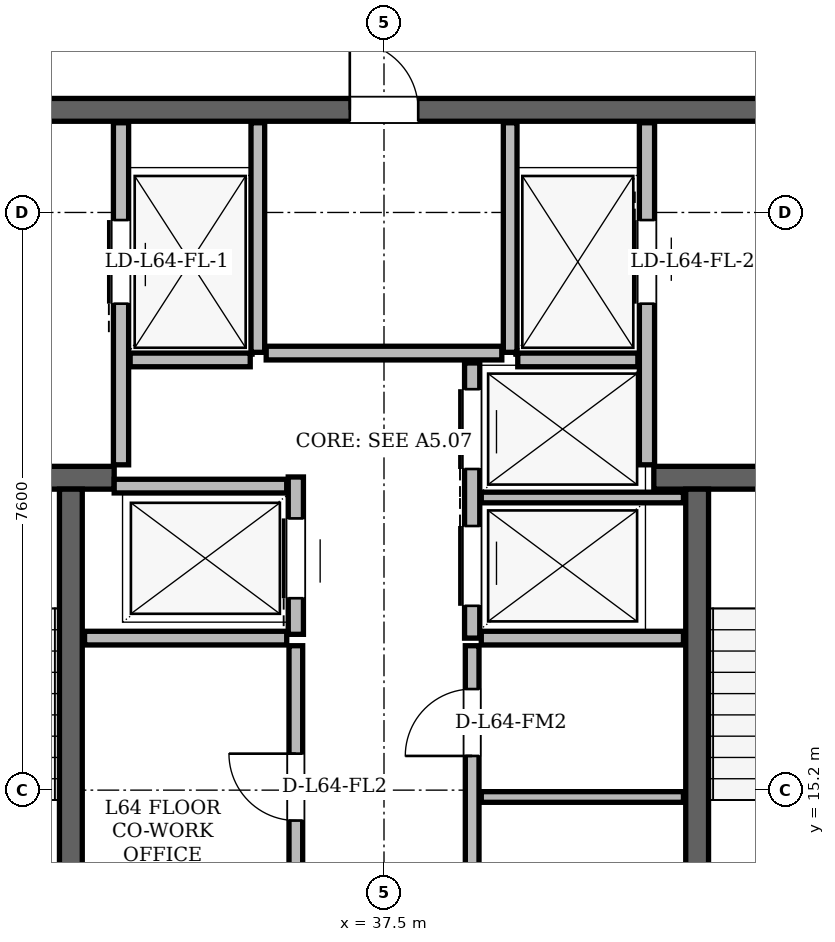
"""IFC4 building model, lengths in metres.
Left out: names, types, materials, properties, quantities, classifications, styles, units other than length and angle.
Written with IfcOpenShell. Run it as: python <this file> out.ifc"""

import sys

from ifc_helpers import new_model, si_unit, direction, frame, frame_2d, origin, place, context, subcontext, project, spatial, rectangle, extrude, element, fill, save


model = new_model("IFC4")
c1 = context("Model", 3, precision=1e-05, world=origin(), true_north=direction((0.0, 1.0)))
c2 = subcontext(c1, "Body", "Model", "MODEL_VIEW")
j1 = project(units=[si_unit("LENGTHUNIT", "METRE"), si_unit("PLANEANGLEUNIT", "RADIAN")], contexts=[c1])
p1 = place(None, origin())
s1 = spatial("IfcSite", under=j1, at=p1, CompositionType="ELEMENT")
p2 = place(p1, origin())
s2 = spatial("IfcBuilding", under=s1, at=p2, CompositionType="ELEMENT")
p3 = place(p2, frame((0.0, 0.0, 241.5)))
s3 = spatial("IfcBuildingStorey", under=s2, at=p3, CompositionType="ELEMENT", Elevation=241.5)
p4 = place(p3, frame((29.65, 24.15, 0.0), z_axis=(0.0, 0.0, 1.0), x_axis=(1.0, 0.0, 0.0)))
e1 = element("IfcWall", 1, at=p4, inside=s3, PredefinedType="SHEAR", context=c2, shape_type="SweptSolid", body=[
    extrude(rectangle(XDim=15.7, YDim=0.3, at=frame_2d((7.85, 0.0))), origin(), (0.0, 0.0, 1.0), 3.34),
])
p5 = place(p4, frame((1.7, 0.0, 0.0)))
e2 = element("IfcOpeningElement", 2, at=p5, cuts=e1, PredefinedType="OPENING", context=c2, shape_type="SweptSolid", body=[
    extrude(rectangle(XDim=1.2, YDim=2.2, at=frame_2d((0.6, 1.1))), frame((0.0, 0.15, 0.0), z_axis=(0.0, -1.0, 0.0), x_axis=(1.0, 0.0, 0.0)), (0.0, 0.0, 1.0), 0.3),
])
p6 = place(p4, frame((12.8, 0.0, 0.0)))
e3 = element("IfcOpeningElement", 3, at=p6, cuts=e1, PredefinedType="OPENING", context=c2, shape_type="SweptSolid", body=[
    extrude(rectangle(XDim=1.2, YDim=2.2, at=frame_2d((0.6, 1.1))), frame((0.0, 0.15, 0.0), z_axis=(0.0, -1.0, 0.0), x_axis=(1.0, 0.0, 0.0)), (0.0, 0.0, 1.0), 0.3),
])
p7 = place(p4, frame((7.4, 0.0, 0.0)))
e4 = element("IfcOpeningElement", 4, at=p7, cuts=e1, PredefinedType="OPENING", context=c2, shape_type="SweptSolid", body=[
    extrude(rectangle(XDim=0.9, YDim=2.05, at=frame_2d((0.45, 1.025))), frame((0.0, 0.15, 0.0), z_axis=(0.0, -1.0, 0.0), x_axis=(1.0, 0.0, 0.0)), (0.0, 0.0, 1.0), 0.3),
])
p8 = place(p3, frame((29.94, 19.31, 0.0), z_axis=(0.0, 0.0, 1.0), x_axis=(1.0, 0.0, 0.0)))
e5 = element("IfcWall", 5, at=p8, inside=s3, PredefinedType="SHEAR", context=c2, shape_type="SweptSolid", body=[
    extrude(rectangle(XDim=4.01, YDim=0.3, at=frame_2d((2.005, 0.0))), origin(), (0.0, 0.0, 1.0), 3.34),
])
p9 = place(p8, frame((1.01, 0.0, 0.0)))
e6 = element("IfcOpeningElement", 6, at=p9, cuts=e5, PredefinedType="OPENING", context=c2, shape_type="SweptSolid", body=[
    extrude(rectangle(XDim=1.4, YDim=2.2, at=frame_2d((0.7, 1.1))), frame((0.0, 0.15, 0.0), z_axis=(0.0, -1.0, 0.0), x_axis=(1.0, 0.0, 0.0)), (0.0, 0.0, 1.0), 0.3),
])
p10 = place(p3, frame((41.05, 19.31, 0.0), z_axis=(0.0, 0.0, 1.0), x_axis=(1.0, 0.0, 0.0)))
e7 = element("IfcWall", 7, at=p10, inside=s3, PredefinedType="SHEAR", context=c2, shape_type="SweptSolid", body=[
    extrude(rectangle(XDim=4.01, YDim=0.3, at=frame_2d((2.005, 0.0))), origin(), (0.0, 0.0, 1.0), 3.34),
])
p11 = place(p10, frame((1.6, 0.0, 0.0)))
e8 = element("IfcOpeningElement", 8, at=p11, cuts=e7, PredefinedType="OPENING", context=c2, shape_type="SweptSolid", body=[
    extrude(rectangle(XDim=1.4, YDim=2.2, at=frame_2d((0.7, 1.1))), frame((0.0, 0.15, 0.0), z_axis=(0.0, -1.0, 0.0), x_axis=(1.0, 0.0, 0.0)), (0.0, 0.0, 1.0), 0.3),
])
for number, where, z_axis, x_axis in (
    (9, (33.38, 11.54, 0.0), (0.0, 0.0, 1.0), (0.0, 1.0, 0.0)),
    (10, (41.62, 11.54, 0.0), (0.0, 0.0, 1.0), (0.0, 1.0, 0.0)),
):
    element("IfcWall", number, at=place(p3, frame(where, z_axis=z_axis, x_axis=x_axis)), inside=s3, PredefinedType="SHEAR", context=c2, shape_type="SweptSolid", body=[
        extrude(rectangle(XDim=7.62, YDim=0.3, at=frame_2d((3.81, 0.0))), origin(), (0.0, 0.0, 1.0), 3.34),
    ])
p12 = place(p3, frame((58.857, 11.097, 0.0), z_axis=(0.0, 0.0, 1.0), x_axis=(-0.499999075663, 0.86602593745, 0.0)))
e11 = element("IfcWall", 11, at=p12, inside=s3, PredefinedType="SOLIDWALL", context=c2, shape_type="SweptSolid", body=[
    extrude(rectangle(XDim=36.951, YDim=0.29, at=frame_2d((18.476, 0.0))), origin(), (0.0, 0.0, 1.0), 2.637),
])
p13 = place(p12, frame((7.615, 0.0, 0.0)))
e12 = element("IfcOpeningElement", 12, at=p13, cuts=e11, PredefinedType="OPENING", context=c2, shape_type="SweptSolid", body=[
    extrude(rectangle(XDim=1.5, YDim=2.2, at=frame_2d((0.75, 1.1))), frame((0.0, 0.145, 0.0), z_axis=(0.0, -1.0, 0.0), x_axis=(1.0, 0.0, 0.0)), (0.0, 0.0, 1.0), 0.29),
])
p14 = place(p12, frame((28.662, 0.0, 0.0)))
e13 = element("IfcOpeningElement", 13, at=p14, cuts=e11, PredefinedType="OPENING", context=c2, shape_type="SweptSolid", body=[
    extrude(rectangle(XDim=1.5, YDim=2.2, at=frame_2d((0.75, 1.1))), frame((0.0, 0.145, 0.0), z_axis=(0.0, -1.0, 0.0), x_axis=(1.0, 0.0, 0.0)), (0.0, 0.0, 1.0), 0.29),
])
p15 = place(p12, frame((3.768, 0.0, 0.85)))
e14 = element("IfcOpeningElement", 14, at=p15, cuts=e11, PredefinedType="OPENING", context=c2, shape_type="SweptSolid", body=[
    extrude(rectangle(XDim=1.2, YDim=1.48, at=frame_2d((0.6, 0.74))), frame((0.0, 0.145, 0.0), z_axis=(0.0, -1.0, 0.0), x_axis=(1.0, 0.0, 0.0)), (0.0, 0.0, 1.0), 0.29),
])
p16 = place(p12, frame((1.122, 0.0, 0.85)))
e15 = element("IfcOpeningElement", 15, at=p16, cuts=e11, PredefinedType="OPENING", context=c2, shape_type="SweptSolid", body=[
    extrude(rectangle(XDim=1.6, YDim=1.677, at=frame_2d((0.8, 0.838))), frame((0.0, 0.145, 0.0), z_axis=(0.0, -1.0, 0.0), x_axis=(1.0, 0.0, 0.0)), (0.0, 0.0, 1.0), 0.29),
])
p17 = place(p12, frame((34.681, 0.0, 0.85)))
e16 = element("IfcOpeningElement", 16, at=p17, cuts=e11, PredefinedType="OPENING", context=c2, shape_type="SweptSolid", body=[
    extrude(rectangle(XDim=1.2, YDim=1.48, at=frame_2d((0.6, 0.74))), frame((0.0, 0.145, 0.0), z_axis=(0.0, -1.0, 0.0), x_axis=(1.0, 0.0, 0.0)), (0.0, 0.0, 1.0), 0.29),
])
p18 = place(p12, frame((16.81, 0.0, 0.85)))
e17 = element("IfcOpeningElement", 17, at=p18, cuts=e11, PredefinedType="OPENING", context=c2, shape_type="SweptSolid", body=[
    extrude(rectangle(XDim=2.2, YDim=1.677, at=frame_2d((1.1, 0.838))), frame((0.0, 0.145, 0.0), z_axis=(0.0, -1.0, 0.0), x_axis=(1.0, 0.0, 0.0)), (0.0, 0.0, 1.0), 0.29),
])
p19 = place(p12, frame((22.803, 0.0, 0.85)))
e18 = element("IfcOpeningElement", 18, at=p19, cuts=e11, PredefinedType="OPENING", context=c2, shape_type="SweptSolid", body=[
    extrude(rectangle(XDim=1.6, YDim=1.677, at=frame_2d((0.8, 0.838))), frame((0.0, 0.145, 0.0), z_axis=(0.0, -1.0, 0.0), x_axis=(1.0, 0.0, 0.0)), (0.0, 0.0, 1.0), 0.29),
])
p20 = place(p12, frame((9.478, 0.0, 0.85)))
e19 = element("IfcOpeningElement", 19, at=p20, cuts=e11, PredefinedType="OPENING", context=c2, shape_type="SweptSolid", body=[
    extrude(rectangle(XDim=1.2, YDim=1.48, at=frame_2d((0.6, 0.74))), frame((0.0, 0.145, 0.0), z_axis=(0.0, -1.0, 0.0), x_axis=(1.0, 0.0, 0.0)), (0.0, 0.0, 1.0), 0.29),
])
p21 = place(p3, frame((34.618, 43.098, 0.0), z_axis=(0.0, 0.0, 1.0), x_axis=(-0.499999075663, -0.86602593745, 0.0)))
e20 = element("IfcWall", 20, at=p21, inside=s3, PredefinedType="SOLIDWALL", context=c2, shape_type="SweptSolid", body=[
    extrude(rectangle(XDim=36.951, YDim=0.29, at=frame_2d((18.476, 0.0))), origin(), (0.0, 0.0, 1.0), 2.637),
])
p22 = place(p21, frame((8.244, 0.0, 0.0)))
e21 = element("IfcOpeningElement", 21, at=p22, cuts=e20, PredefinedType="OPENING", context=c2, shape_type="SweptSolid", body=[
    extrude(rectangle(XDim=1.5, YDim=2.2, at=frame_2d((0.75, 1.1))), frame((0.0, 0.145, 0.0), z_axis=(0.0, -1.0, 0.0), x_axis=(1.0, 0.0, 0.0)), (0.0, 0.0, 1.0), 0.29),
])
p23 = place(p21, frame((32.022, 0.0, 0.0)))
e22 = element("IfcOpeningElement", 22, at=p23, cuts=e20, PredefinedType="OPENING", context=c2, shape_type="SweptSolid", body=[
    extrude(rectangle(XDim=1.5, YDim=2.2, at=frame_2d((0.75, 1.1))), frame((0.0, 0.145, 0.0), z_axis=(0.0, -1.0, 0.0), x_axis=(1.0, 0.0, 0.0)), (0.0, 0.0, 1.0), 0.29),
])
p24 = place(p21, frame((21.911, 0.0, 0.85)))
e23 = element("IfcOpeningElement", 23, at=p24, cuts=e20, PredefinedType="OPENING", context=c2, shape_type="SweptSolid", body=[
    extrude(rectangle(XDim=2.4, YDim=1.677, at=frame_2d((1.2, 0.838))), frame((0.0, 0.145, 0.0), z_axis=(0.0, -1.0, 0.0), x_axis=(1.0, 0.0, 0.0)), (0.0, 0.0, 1.0), 0.29),
])
p25 = place(p21, frame((28.29, 0.0, 0.85)))
e24 = element("IfcOpeningElement", 24, at=p25, cuts=e20, PredefinedType="OPENING", context=c2, shape_type="SweptSolid", body=[
    extrude(rectangle(XDim=1.2, YDim=1.48, at=frame_2d((0.6, 0.74))), frame((0.0, 0.145, 0.0), z_axis=(0.0, -1.0, 0.0), x_axis=(1.0, 0.0, 0.0)), (0.0, 0.0, 1.0), 0.29),
])
p26 = place(p21, frame((34.755, 0.0, 0.85)))
e25 = element("IfcOpeningElement", 25, at=p26, cuts=e20, PredefinedType="OPENING", context=c2, shape_type="SweptSolid", body=[
    extrude(rectangle(XDim=1.2, YDim=1.48, at=frame_2d((0.6, 0.74))), frame((0.0, 0.145, 0.0), z_axis=(0.0, -1.0, 0.0), x_axis=(1.0, 0.0, 0.0)), (0.0, 0.0, 1.0), 0.29),
])
p27 = place(p21, frame((12.233, 0.0, 0.85)))
e26 = element("IfcOpeningElement", 26, at=p27, cuts=e20, PredefinedType="OPENING", context=c2, shape_type="SweptSolid", body=[
    extrude(rectangle(XDim=1.2, YDim=1.48, at=frame_2d((0.6, 0.74))), frame((0.0, 0.145, 0.0), z_axis=(0.0, -1.0, 0.0), x_axis=(1.0, 0.0, 0.0)), (0.0, 0.0, 1.0), 0.29),
])
p28 = place(p21, frame((16.59, 0.0, 0.85)))
e27 = element("IfcOpeningElement", 27, at=p28, cuts=e20, PredefinedType="OPENING", context=c2, shape_type="SweptSolid", body=[
    extrude(rectangle(XDim=2.0, YDim=1.677, at=frame_2d((1.0, 0.838))), frame((0.0, 0.145, 0.0), z_axis=(0.0, -1.0, 0.0), x_axis=(1.0, 0.0, 0.0)), (0.0, 0.0, 1.0), 0.29),
])
p29 = place(p21, frame((3.092, 0.0, 0.85)))
e28 = element("IfcOpeningElement", 28, at=p29, cuts=e20, PredefinedType="OPENING", context=c2, shape_type="SweptSolid", body=[
    extrude(rectangle(XDim=1.2, YDim=1.48, at=frame_2d((0.6, 0.74))), frame((0.0, 0.145, 0.0), z_axis=(0.0, -1.0, 0.0), x_axis=(1.0, 0.0, 0.0)), (0.0, 0.0, 1.0), 0.29),
])
p30 = place(p3, frame((34.04, 19.48, 0.0), z_axis=(0.0, 0.0, 1.0), x_axis=(0.0, 1.0, 0.0)))
e29 = element("IfcWall", 29, at=p30, inside=s3, PredefinedType="PARTITIONING", context=c2, shape_type="SweptSolid", body=[
    extrude(rectangle(XDim=4.5, YDim=0.2, at=frame_2d((2.25, 0.0))), origin(), (0.0, 0.0, 1.0), 3.34),
])
p31 = place(p30, frame((2.12, 0.0, 0.0)))
e30 = element("IfcOpeningElement", 30, at=p31, cuts=e29, PredefinedType="OPENING", context=c2, shape_type="SweptSolid", body=[
    extrude(rectangle(XDim=1.1, YDim=2.2, at=frame_2d((0.55, 1.1))), frame((0.0, 0.1, 0.0), z_axis=(0.0, -1.0, 0.0), x_axis=(1.0, 0.0, 0.0)), (0.0, 0.0, 1.0), 0.2),
])
p32 = place(p3, frame((35.84, 20.96, 0.0), z_axis=(0.0, 0.0, 1.0), x_axis=(0.0, 1.0, 0.0)))
e31 = element("IfcWall", 31, at=p32, inside=s3, PredefinedType="PARTITIONING", context=c2, shape_type="SweptSolid", body=[
    extrude(rectangle(XDim=3.02, YDim=0.18, at=frame_2d((1.51, 0.0))), origin(), (0.0, 0.0, 1.0), 3.34),
])
p33 = place(p3, frame((34.16, 20.86, 0.0), z_axis=(0.0, 0.0, 1.0), x_axis=(1.0, 0.0, 0.0)))
e32 = element("IfcWall", 32, at=p33, inside=s3, PredefinedType="PARTITIONING", context=c2, shape_type="SweptSolid", body=[
    extrude(rectangle(XDim=1.58, YDim=0.18, at=frame_2d((0.79, 0.0))), origin(), (0.0, 0.0, 1.0), 3.34),
])
p34 = place(p3, frame((40.96, 19.48, 0.0), z_axis=(0.0, 0.0, 1.0), x_axis=(0.0, 1.0, 0.0)))
e33 = element("IfcWall", 33, at=p34, inside=s3, PredefinedType="PARTITIONING", context=c2, shape_type="SweptSolid", body=[
    extrude(rectangle(XDim=4.5, YDim=0.2, at=frame_2d((2.25, 0.0))), origin(), (0.0, 0.0, 1.0), 3.34),
])
p35 = place(p34, frame((2.12, 0.0, 0.0)))
e34 = element("IfcOpeningElement", 34, at=p35, cuts=e33, PredefinedType="OPENING", context=c2, shape_type="SweptSolid", body=[
    extrude(rectangle(XDim=1.1, YDim=2.2, at=frame_2d((0.55, 1.1))), frame((0.0, 0.1, 0.0), z_axis=(0.0, -1.0, 0.0), x_axis=(1.0, 0.0, 0.0)), (0.0, 0.0, 1.0), 0.2),
])
p36 = place(p3, frame((39.16, 20.96, 0.0), z_axis=(0.0, 0.0, 1.0), x_axis=(0.0, 1.0, 0.0)))
e35 = element("IfcWall", 35, at=p36, inside=s3, PredefinedType="PARTITIONING", context=c2, shape_type="SweptSolid", body=[
    extrude(rectangle(XDim=3.02, YDim=0.18, at=frame_2d((1.51, 0.0))), origin(), (0.0, 0.0, 1.0), 3.34),
])
p37 = place(p3, frame((39.26, 20.86, 0.0), z_axis=(0.0, 0.0, 1.0), x_axis=(1.0, 0.0, 0.0)))
e36 = element("IfcWall", 36, at=p37, inside=s3, PredefinedType="PARTITIONING", context=c2, shape_type="SweptSolid", body=[
    extrude(rectangle(XDim=1.58, YDim=0.18, at=frame_2d((0.79, 0.0))), origin(), (0.0, 0.0, 1.0), 3.34),
])
p38 = place(p3, frame((36.34, 17.25, 0.0), z_axis=(0.0, 0.0, 1.0), x_axis=(0.0, 1.0, 0.0)))
e37 = element("IfcWall", 37, at=p38, inside=s3, PredefinedType="PARTITIONING", context=c2, shape_type="SweptSolid", body=[
    extrude(rectangle(XDim=2.07, YDim=0.2, at=frame_2d((1.035, 0.0))), origin(), (0.0, 0.0, 1.0), 3.34),
])
p39 = place(p38, frame((0.475, 0.0, 0.0)))
e38 = element("IfcOpeningElement", 38, at=p39, cuts=e37, PredefinedType="OPENING", context=c2, shape_type="SweptSolid", body=[
    extrude(rectangle(XDim=1.05, YDim=2.15, at=frame_2d((0.525, 1.075))), frame((0.0, 0.1, 0.0), z_axis=(0.0, -1.0, 0.0), x_axis=(1.0, 0.0, 0.0)), (0.0, 0.0, 1.0), 0.2),
])
p40 = place(p3, frame((33.95, 19.2, 0.0), z_axis=(0.0, 0.0, 1.0), x_axis=(1.0, 0.0, 0.0)))
e39 = element("IfcWall", 39, at=p40, inside=s3, PredefinedType="PARTITIONING", context=c2, shape_type="SweptSolid", body=[
    extrude(rectangle(XDim=2.27, YDim=0.18, at=frame_2d((1.135, 0.0))), origin(), (0.0, 0.0, 1.0), 3.34),
])
p41 = place(p3, frame((33.56, 17.2, 0.0), z_axis=(0.0, 0.0, 1.0), x_axis=(1.0, 0.0, 0.0)))
e40 = element("IfcWall", 40, at=p41, inside=s3, PredefinedType="PARTITIONING", context=c2, shape_type="SweptSolid", body=[
    extrude(rectangle(XDim=2.66, YDim=0.18, at=frame_2d((1.33, 0.0))), origin(), (0.0, 0.0, 1.0), 3.34),
])
p42 = place(p3, frame((36.34, 11.55, 0.0), z_axis=(0.0, 0.0, 1.0), x_axis=(0.0, 1.0, 0.0)))
e41 = element("IfcWall", 41, at=p42, inside=s3, PredefinedType="PARTITIONING", context=c2, shape_type="SweptSolid", body=[
    extrude(rectangle(XDim=5.55, YDim=0.18, at=frame_2d((2.775, 0.0))), origin(), (0.0, 0.0, 1.0), 3.34),
])
p43 = place(p42, frame((0.55, 0.0, 0.0)))
e42 = element("IfcOpeningElement", 42, at=p43, cuts=e41, PredefinedType="OPENING", context=c2, shape_type="SweptSolid", body=[
    extrude(rectangle(XDim=0.88, YDim=2.08, at=frame_2d((0.44, 1.04))), frame((0.0, 0.09, 0.0), z_axis=(0.0, -1.0, 0.0), x_axis=(1.0, 0.0, 0.0)), (0.0, 0.0, 1.0), 0.18),
])
p44 = place(p42, frame((3.25, 0.0, 0.0)))
e43 = element("IfcOpeningElement", 43, at=p44, cuts=e41, PredefinedType="OPENING", context=c2, shape_type="SweptSolid", body=[
    extrude(rectangle(XDim=0.88, YDim=2.08, at=frame_2d((0.44, 1.04))), frame((0.0, 0.09, 0.0), z_axis=(0.0, -1.0, 0.0), x_axis=(1.0, 0.0, 0.0)), (0.0, 0.0, 1.0), 0.18),
])
p45 = place(p3, frame((38.66, 17.2, 0.0), z_axis=(0.0, 0.0, 1.0), x_axis=(0.0, 1.0, 0.0)))
e44 = element("IfcWall", 44, at=p45, inside=s3, PredefinedType="PARTITIONING", context=c2, shape_type="SweptSolid", body=[
    extrude(rectangle(XDim=3.62, YDim=0.2, at=frame_2d((1.81, 0.0))), origin(), (0.0, 0.0, 1.0), 3.34),
])
p46 = place(p45, frame((0.425, 0.0, 0.0)))
e45 = element("IfcOpeningElement", 45, at=p46, cuts=e44, PredefinedType="OPENING", context=c2, shape_type="SweptSolid", body=[
    extrude(rectangle(XDim=1.05, YDim=2.15, at=frame_2d((0.525, 1.075))), frame((0.0, 0.1, 0.0), z_axis=(0.0, -1.0, 0.0), x_axis=(1.0, 0.0, 0.0)), (0.0, 0.0, 1.0), 0.2),
])
p47 = place(p45, frame((2.225, 0.0, 0.0)))
e46 = element("IfcOpeningElement", 46, at=p47, cuts=e44, PredefinedType="OPENING", context=c2, shape_type="SweptSolid", body=[
    extrude(rectangle(XDim=1.05, YDim=2.15, at=frame_2d((0.525, 1.075))), frame((0.0, 0.1, 0.0), z_axis=(0.0, -1.0, 0.0), x_axis=(1.0, 0.0, 0.0)), (0.0, 0.0, 1.0), 0.2),
])
p48 = place(p3, frame((38.78, 17.2, 0.0), z_axis=(0.0, 0.0, 1.0), x_axis=(1.0, 0.0, 0.0)))
e47 = element("IfcWall", 47, at=p48, inside=s3, PredefinedType="PARTITIONING", context=c2, shape_type="SweptSolid", body=[
    extrude(rectangle(XDim=2.66, YDim=0.18, at=frame_2d((1.33, 0.0))), origin(), (0.0, 0.0, 1.0), 3.34),
])
p49 = place(p3, frame((38.78, 19.05, 0.0), z_axis=(0.0, 0.0, 1.0), x_axis=(1.0, 0.0, 0.0)))
e48 = element("IfcWall", 48, at=p49, inside=s3, PredefinedType="PARTITIONING", context=c2, shape_type="SweptSolid", body=[
    extrude(rectangle(XDim=2.66, YDim=0.14, at=frame_2d((1.33, 0.0))), origin(), (0.0, 0.0, 1.0), 3.34),
])
p50 = place(p3, frame((38.66, 11.55, 0.0), z_axis=(0.0, 0.0, 1.0), x_axis=(0.0, 1.0, 0.0)))
e49 = element("IfcWall", 49, at=p50, inside=s3, PredefinedType="PARTITIONING", context=c2, shape_type="SweptSolid", body=[
    extrude(rectangle(XDim=5.55, YDim=0.18, at=frame_2d((2.775, 0.0))), origin(), (0.0, 0.0, 1.0), 3.34),
])
p51 = place(p50, frame((1.35, 0.0, 0.0)))
e50 = element("IfcOpeningElement", 50, at=p51, cuts=e49, PredefinedType="OPENING", context=c2, shape_type="SweptSolid", body=[
    extrude(rectangle(XDim=0.88, YDim=2.08, at=frame_2d((0.44, 1.04))), frame((0.0, 0.09, 0.0), z_axis=(0.0, -1.0, 0.0), x_axis=(1.0, 0.0, 0.0)), (0.0, 0.0, 1.0), 0.18),
])
p52 = place(p50, frame((4.1, 0.0, 0.0)))
e51 = element("IfcOpeningElement", 51, at=p52, cuts=e49, PredefinedType="OPENING", context=c2, shape_type="SweptSolid", body=[
    extrude(rectangle(XDim=0.88, YDim=2.08, at=frame_2d((0.44, 1.04))), frame((0.0, 0.09, 0.0), z_axis=(0.0, -1.0, 0.0), x_axis=(1.0, 0.0, 0.0)), (0.0, 0.0, 1.0), 0.18),
])
p53 = place(p3, frame((38.78, 15.11, 0.0), z_axis=(0.0, 0.0, 1.0), x_axis=(1.0, 0.0, 0.0)))
e52 = element("IfcWall", 52, at=p53, inside=s3, PredefinedType="PARTITIONING", context=c2, shape_type="SweptSolid", body=[
    extrude(rectangle(XDim=2.66, YDim=0.14, at=frame_2d((1.33, 0.0))), origin(), (0.0, 0.0, 1.0), 3.34),
])
p54 = place(p3, frame((35.95, 20.95, 0.0), z_axis=(0.0, 0.0, 1.0), x_axis=(1.0, 0.0, 0.0)))
e53 = element("IfcWall", 53, at=p54, inside=s3, PredefinedType="PARTITIONING", context=c2, shape_type="SweptSolid", body=[
    extrude(rectangle(XDim=3.1, YDim=0.18, at=frame_2d((1.55, 0.0))), origin(), (0.0, 0.0, 1.0), 3.34),
])
p55 = place(p44, origin())
e54 = element("IfcDoor", 54, at=p55, inside=s3, OperationType="SINGLE_SWING_RIGHT", PredefinedType="DOOR", context=c2, shape_type="SweptSolid", body=[
    extrude(rectangle(XDim=0.88, YDim=2.08, at=frame_2d((0.44, 1.04))), frame((0.0, 0.025, 0.0), z_axis=(0.0, -1.0, 0.0), x_axis=(1.0, 0.0, 0.0)), (0.0, 0.0, 1.0), 0.05),
])
fill(e43, e54)
p56 = place(p52, origin())
e55 = element("IfcDoor", 55, at=p56, inside=s3, OperationType="SINGLE_SWING_LEFT", PredefinedType="DOOR", context=c2, shape_type="SweptSolid", body=[
    extrude(rectangle(XDim=0.88, YDim=2.08, at=frame_2d((0.44, 1.04))), frame((0.0, 0.025, 0.0), z_axis=(0.0, -1.0, 0.0), x_axis=(1.0, 0.0, 0.0)), (0.0, 0.0, 1.0), 0.05),
])
fill(e51, e55)
p57 = place(p31, origin())
e56 = element("IfcDoor", 56, at=p57, inside=s3, OperationType="SLIDING_TO_LEFT", PredefinedType="DOOR", context=c2, shape_type="SweptSolid", body=[
    extrude(rectangle(XDim=1.1, YDim=2.2, at=frame_2d((0.55, 1.1))), frame((0.0, 0.025, 0.0), z_axis=(0.0, -1.0, 0.0), x_axis=(1.0, 0.0, 0.0)), (0.0, 0.0, 1.0), 0.05),
])
fill(e30, e56)
p58 = place(p35, origin())
e57 = element("IfcDoor", 57, at=p58, inside=s3, OperationType="SLIDING_TO_RIGHT", PredefinedType="DOOR", context=c2, shape_type="SweptSolid", body=[
    extrude(rectangle(XDim=1.1, YDim=2.2, at=frame_2d((0.55, 1.1))), frame((0.0, 0.025, 0.0), z_axis=(0.0, -1.0, 0.0), x_axis=(1.0, 0.0, 0.0)), (0.0, 0.0, 1.0), 0.05),
])
fill(e34, e57)
p59 = place(p39, origin())
e58 = element("IfcDoor", 58, at=p59, inside=s3, OperationType="SLIDING_TO_LEFT", PredefinedType="DOOR", context=c2, shape_type="SweptSolid", body=[
    extrude(rectangle(XDim=1.05, YDim=2.15, at=frame_2d((0.525, 1.075))), frame((0.0, 0.025, 0.0), z_axis=(0.0, -1.0, 0.0), x_axis=(1.0, 0.0, 0.0)), (0.0, 0.0, 1.0), 0.05),
])
fill(e38, e58)
p60 = place(p46, origin())
e59 = element("IfcDoor", 59, at=p60, inside=s3, OperationType="SLIDING_TO_RIGHT", PredefinedType="DOOR", context=c2, shape_type="SweptSolid", body=[
    extrude(rectangle(XDim=1.05, YDim=2.15, at=frame_2d((0.525, 1.075))), frame((0.0, 0.025, 0.0), z_axis=(0.0, -1.0, 0.0), x_axis=(1.0, 0.0, 0.0)), (0.0, 0.0, 1.0), 0.05),
])
fill(e45, e59)
p61 = place(p47, origin())
e60 = element("IfcDoor", 60, at=p61, inside=s3, OperationType="SLIDING_TO_LEFT", PredefinedType="DOOR", context=c2, shape_type="SweptSolid", body=[
    extrude(rectangle(XDim=1.05, YDim=2.15, at=frame_2d((0.525, 1.075))), frame((0.0, 0.025, 0.0), z_axis=(0.0, -1.0, 0.0), x_axis=(1.0, 0.0, 0.0)), (0.0, 0.0, 1.0), 0.05),
])
fill(e46, e60)
p62 = place(p7, origin())
e61 = element("IfcDoor", 61, at=p62, inside=s3, OperationType="SINGLE_SWING_LEFT", PredefinedType="DOOR", context=c2, shape_type="SweptSolid", body=[
    extrude(rectangle(XDim=0.9, YDim=2.05, at=frame_2d((0.45, 1.025))), frame((0.0, 0.025, 0.0), z_axis=(0.0, -1.0, 0.0), x_axis=(1.0, 0.0, 0.0)), (0.0, 0.0, 1.0), 0.05),
])
fill(e4, e61)
save(model, sys.argv[1])
